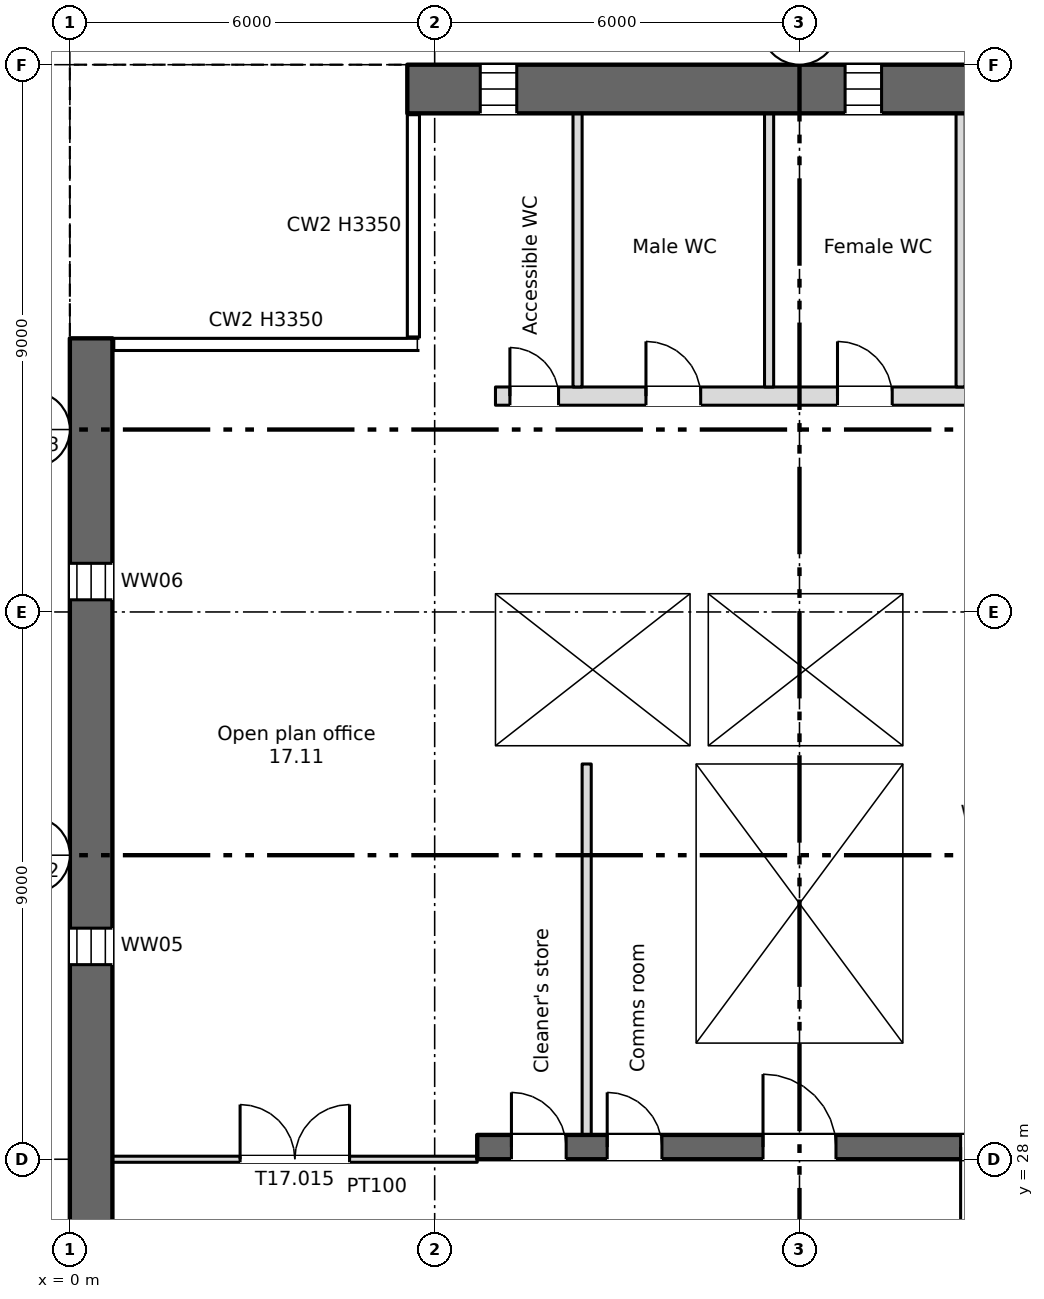
"""IFC4 building model, lengths in metres.
Left out: names, types, materials, properties, quantities, classifications, styles, units other than length and angle.
Written with IfcOpenShell. Run it as: python <this file> out.ifc"""

import sys

from ifc_helpers import new_model, si_unit, direction, frame, frame_2d, origin, place, context, subcontext, project, spatial, rectangle, extrude, element, fill, save


model = new_model("IFC4")
c1 = context("Model", 3, precision=1e-05, world=origin(), true_north=direction((0.0, 1.0)))
c2 = subcontext(c1, "Body", "Model", "MODEL_VIEW")
j1 = project(units=[si_unit("LENGTHUNIT", "METRE"), si_unit("PLANEANGLEUNIT", "RADIAN")], contexts=[c1])
p1 = place(None, origin())
s1 = spatial("IfcSite", under=j1, at=p1, CompositionType="ELEMENT")
p2 = place(p1, origin())
s2 = spatial("IfcBuilding", under=s1, at=p2, CompositionType="ELEMENT")
p3 = place(p2, frame((0.0, 0.0, 110.0)))
s3 = spatial("IfcBuildingStorey", under=s2, at=p3, CompositionType="ELEMENT", Elevation=110.0)
p4 = place(p3, frame((0.35, 6.0, 0.0), z_axis=(0.0, 0.0, 1.0), x_axis=(0.0, 1.0, 0.0)))
e1 = element("IfcWall", 1, at=p4, inside=s3, PredefinedType="SHEAR", context=c2, shape_type="SweptSolid", body=[
    extrude(rectangle(XDim=35.5, YDim=0.7, at=frame_2d((17.75, 0.0))), origin(), (0.0, 0.0, 1.0), 3.35),
])
p5 = place(p4, frame((1.2, 0.0, 0.6)))
e2 = element("IfcOpeningElement", 2, at=p5, cuts=e1, PredefinedType="OPENING", context=c2, shape_type="SweptSolid", body=[
    extrude(rectangle(XDim=0.6, YDim=2.4, at=frame_2d((0.3, 1.2))), frame((0.0, 0.36, 0.0), z_axis=(0.0, -1.0, 0.0), x_axis=(1.0, 0.0, 0.0)), (0.0, 0.0, 1.0), 0.72),
])
p6 = place(p4, frame((7.2, 0.0, 0.6)))
e3 = element("IfcOpeningElement", 3, at=p6, cuts=e1, PredefinedType="OPENING", context=c2, shape_type="SweptSolid", body=[
    extrude(rectangle(XDim=0.6, YDim=2.4, at=frame_2d((0.3, 1.2))), frame((0.0, 0.36, 0.0), z_axis=(0.0, -1.0, 0.0), x_axis=(1.0, 0.0, 0.0)), (0.0, 0.0, 1.0), 0.72),
])
p7 = place(p4, frame((13.2, 0.0, 0.6)))
e4 = element("IfcOpeningElement", 4, at=p7, cuts=e1, PredefinedType="OPENING", context=c2, shape_type="SweptSolid", body=[
    extrude(rectangle(XDim=0.6, YDim=2.4, at=frame_2d((0.3, 1.2))), frame((0.0, 0.36, 0.0), z_axis=(0.0, -1.0, 0.0), x_axis=(1.0, 0.0, 0.0)), (0.0, 0.0, 1.0), 0.72),
])
p8 = place(p4, frame((19.2, 0.0, 0.6)))
e5 = element("IfcOpeningElement", 5, at=p8, cuts=e1, PredefinedType="OPENING", context=c2, shape_type="SweptSolid", body=[
    extrude(rectangle(XDim=0.6, YDim=2.4, at=frame_2d((0.3, 1.2))), frame((0.0, 0.36, 0.0), z_axis=(0.0, -1.0, 0.0), x_axis=(1.0, 0.0, 0.0)), (0.0, 0.0, 1.0), 0.72),
])
p9 = place(p4, frame((25.2, 0.0, 0.6)))
e6 = element("IfcOpeningElement", 6, at=p9, cuts=e1, PredefinedType="OPENING", context=c2, shape_type="SweptSolid", body=[
    extrude(rectangle(XDim=0.6, YDim=2.4, at=frame_2d((0.3, 1.2))), frame((0.0, 0.36, 0.0), z_axis=(0.0, -1.0, 0.0), x_axis=(1.0, 0.0, 0.0)), (0.0, 0.0, 1.0), 0.72),
])
p10 = place(p4, frame((31.2, 0.0, 0.6)))
e7 = element("IfcOpeningElement", 7, at=p10, cuts=e1, PredefinedType="OPENING", context=c2, shape_type="SweptSolid", body=[
    extrude(rectangle(XDim=0.6, YDim=2.4, at=frame_2d((0.3, 1.2))), frame((0.0, 0.36, 0.0), z_axis=(0.0, -1.0, 0.0), x_axis=(1.0, 0.0, 0.0)), (0.0, 0.0, 1.0), 0.72),
])
p11 = place(p3, frame((5.55, 45.6, 0.0), z_axis=(0.0, 0.0, 1.0), x_axis=(1.0, 0.0, 0.0)))
e8 = element("IfcWall", 8, at=p11, inside=s3, PredefinedType="SHEAR", context=c2, shape_type="SweptSolid", body=[
    extrude(rectangle(XDim=60.9, YDim=0.8, at=frame_2d((30.45, 0.0))), origin(), (0.0, 0.0, 1.0), 3.35),
])
p12 = place(p11, frame((1.2, 0.0, 0.6)))
e9 = element("IfcOpeningElement", 9, at=p12, cuts=e8, PredefinedType="OPENING", context=c2, shape_type="SweptSolid", body=[
    extrude(rectangle(XDim=0.6, YDim=2.4, at=frame_2d((0.3, 1.2))), frame((0.0, 0.41, 0.0), z_axis=(0.0, -1.0, 0.0), x_axis=(1.0, 0.0, 0.0)), (0.0, 0.0, 1.0), 0.82),
])
p13 = place(p11, frame((7.2, 0.0, 0.6)))
e10 = element("IfcOpeningElement", 10, at=p13, cuts=e8, PredefinedType="OPENING", context=c2, shape_type="SweptSolid", body=[
    extrude(rectangle(XDim=0.6, YDim=2.4, at=frame_2d((0.3, 1.2))), frame((0.0, 0.41, 0.0), z_axis=(0.0, -1.0, 0.0), x_axis=(1.0, 0.0, 0.0)), (0.0, 0.0, 1.0), 0.82),
])
p14 = place(p3, frame((6.7, 28.2, 0.0), z_axis=(0.0, 0.0, 1.0), x_axis=(1.0, 0.0, 0.0)))
e11 = element("IfcWall", 11, at=p14, inside=s3, PredefinedType="SHEAR", context=c2, shape_type="SweptSolid", body=[
    extrude(rectangle(XDim=57.8, YDim=0.4, at=frame_2d((28.9, 0.0))), origin(), (0.0, 0.0, 1.0), 3.35),
])
p15 = place(p14, frame((12.562, 0.0, 0.0)))
e12 = element("IfcOpeningElement", 12, at=p15, cuts=e11, PredefinedType="OPENING", context=c2, shape_type="SweptSolid", body=[
    extrude(rectangle(XDim=0.9, YDim=2.1, at=frame_2d((0.45, 1.05))), frame((0.0, 0.21, 0.0), z_axis=(0.0, -1.0, 0.0), x_axis=(1.0, 0.0, 0.0)), (0.0, 0.0, 1.0), 0.42),
])
p16 = place(p14, frame((15.137, 0.0, 0.0)))
e13 = element("IfcOpeningElement", 13, at=p16, cuts=e11, PredefinedType="OPENING", context=c2, shape_type="SweptSolid", body=[
    extrude(rectangle(XDim=0.9, YDim=2.1, at=frame_2d((0.45, 1.05))), frame((0.0, 0.21, 0.0), z_axis=(0.0, -1.0, 0.0), x_axis=(1.0, 0.0, 0.0)), (0.0, 0.0, 1.0), 0.42),
])
p17 = place(p14, frame((49.85, 0.0, 0.0)))
e14 = element("IfcOpeningElement", 14, at=p17, cuts=e11, PredefinedType="OPENING", context=c2, shape_type="SweptSolid", body=[
    extrude(rectangle(XDim=0.9, YDim=2.1, at=frame_2d((0.45, 1.05))), frame((0.0, 0.21, 0.0), z_axis=(0.0, -1.0, 0.0), x_axis=(1.0, 0.0, 0.0)), (0.0, 0.0, 1.0), 0.42),
])
p18 = place(p14, frame((0.562, 0.0, 0.0)))
e15 = element("IfcOpeningElement", 15, at=p18, cuts=e11, PredefinedType="OPENING", context=c2, shape_type="SweptSolid", body=[
    extrude(rectangle(XDim=0.9, YDim=2.1, at=frame_2d((0.45, 1.05))), frame((0.0, 0.21, 0.0), z_axis=(0.0, -1.0, 0.0), x_axis=(1.0, 0.0, 0.0)), (0.0, 0.0, 1.0), 0.42),
])
p19 = place(p14, frame((2.137, 0.0, 0.0)))
e16 = element("IfcOpeningElement", 16, at=p19, cuts=e11, PredefinedType="OPENING", context=c2, shape_type="SweptSolid", body=[
    extrude(rectangle(XDim=0.9, YDim=2.1, at=frame_2d((0.45, 1.05))), frame((0.0, 0.21, 0.0), z_axis=(0.0, -1.0, 0.0), x_axis=(1.0, 0.0, 0.0)), (0.0, 0.0, 1.0), 0.42),
])
p20 = place(p14, frame((4.7, 0.0, 0.0)))
e17 = element("IfcOpeningElement", 17, at=p20, cuts=e11, PredefinedType="OPENING", context=c2, shape_type="SweptSolid", body=[
    extrude(rectangle(XDim=1.2, YDim=2.1, at=frame_2d((0.6, 1.05))), frame((0.0, 0.21, 0.0), z_axis=(0.0, -1.0, 0.0), x_axis=(1.0, 0.0, 0.0)), (0.0, 0.0, 1.0), 0.42),
])
p21 = place(p14, frame((31.7, 0.0, 0.0)))
e18 = element("IfcOpeningElement", 18, at=p21, cuts=e11, PredefinedType="OPENING", context=c2, shape_type="SweptSolid", body=[
    extrude(rectangle(XDim=1.2, YDim=2.1, at=frame_2d((0.6, 1.05))), frame((0.0, 0.21, 0.0), z_axis=(0.0, -1.0, 0.0), x_axis=(1.0, 0.0, 0.0)), (0.0, 0.0, 1.0), 0.42),
])
p22 = place(p14, frame((55.2, 0.0, 0.0)))
e19 = element("IfcOpeningElement", 19, at=p22, cuts=e11, PredefinedType="OPENING", context=c2, shape_type="SweptSolid", body=[
    extrude(rectangle(XDim=1.2, YDim=2.1, at=frame_2d((0.6, 1.05))), frame((0.0, 0.21, 0.0), z_axis=(0.0, -1.0, 0.0), x_axis=(1.0, 0.0, 0.0)), (0.0, 0.0, 1.0), 0.42),
])
p23 = place(p14, frame((21.7, 0.0, 0.0)))
e20 = element("IfcOpeningElement", 20, at=p23, cuts=e11, PredefinedType="OPENING", context=c2, shape_type="SweptSolid", body=[
    extrude(rectangle(XDim=1.2, YDim=2.1, at=frame_2d((0.6, 1.05))), frame((0.0, 0.21, 0.0), z_axis=(0.0, -1.0, 0.0), x_axis=(1.0, 0.0, 0.0)), (0.0, 0.0, 1.0), 0.42),
])
p24 = place(p14, frame((41.7, 0.0, 0.0)))
e21 = element("IfcOpeningElement", 21, at=p24, cuts=e11, PredefinedType="OPENING", context=c2, shape_type="SweptSolid", body=[
    extrude(rectangle(XDim=1.2, YDim=2.1, at=frame_2d((0.6, 1.05))), frame((0.0, 0.21, 0.0), z_axis=(0.0, -1.0, 0.0), x_axis=(1.0, 0.0, 0.0)), (0.0, 0.0, 1.0), 0.42),
])
p25 = place(p14, frame((24.85, 0.0, 0.0)))
e22 = element("IfcOpeningElement", 22, at=p25, cuts=e11, PredefinedType="OPENING", context=c2, shape_type="SweptSolid", body=[
    extrude(rectangle(XDim=2.4, YDim=2.1, at=frame_2d((1.2, 1.05))), frame((0.0, 0.21, 0.0), z_axis=(0.0, -1.0, 0.0), x_axis=(1.0, 0.0, 0.0)), (0.0, 0.0, 1.0), 0.42),
])
p26 = place(p14, frame((37.35, 0.0, 0.0)))
e23 = element("IfcOpeningElement", 23, at=p26, cuts=e11, PredefinedType="OPENING", context=c2, shape_type="SweptSolid", body=[
    extrude(rectangle(XDim=2.4, YDim=2.1, at=frame_2d((1.2, 1.05))), frame((0.0, 0.21, 0.0), z_axis=(0.0, -1.0, 0.0), x_axis=(1.0, 0.0, 0.0)), (0.0, 0.0, 1.0), 0.42),
])
p27 = place(p14, frame((7.95, 0.0, 0.0)))
e24 = element("IfcOpeningElement", 24, at=p27, cuts=e11, PredefinedType="OPENING", context=c2, shape_type="SweptSolid", body=[
    extrude(rectangle(XDim=2.4, YDim=2.1, at=frame_2d((1.2, 1.05))), frame((0.0, 0.21, 0.0), z_axis=(0.0, -1.0, 0.0), x_axis=(1.0, 0.0, 0.0)), (0.0, 0.0, 1.0), 0.42),
])
p28 = place(p14, frame((28.85, 0.0, 0.0)))
e25 = element("IfcOpeningElement", 25, at=p28, cuts=e11, PredefinedType="OPENING", context=c2, shape_type="SweptSolid", body=[
    extrude(rectangle(XDim=0.9, YDim=2.1, at=frame_2d((0.45, 1.05))), frame((0.0, 0.21, 0.0), z_axis=(0.0, -1.0, 0.0), x_axis=(1.0, 0.0, 0.0)), (0.0, 0.0, 1.0), 0.42),
])
p29 = place(p14, frame((34.85, 0.0, 0.0)))
e26 = element("IfcOpeningElement", 26, at=p29, cuts=e11, PredefinedType="OPENING", context=c2, shape_type="SweptSolid", body=[
    extrude(rectangle(XDim=0.9, YDim=2.1, at=frame_2d((0.45, 1.05))), frame((0.0, 0.21, 0.0), z_axis=(0.0, -1.0, 0.0), x_axis=(1.0, 0.0, 0.0)), (0.0, 0.0, 1.0), 0.42),
])
p30 = place(p3, frame((6.85, 28.4, 0.0), z_axis=(0.0, 0.0, 1.0), x_axis=(0.0, 1.0, 0.0)))
e27 = element("IfcWall", 27, at=p30, inside=s3, PredefinedType="SHEAR", context=c2, shape_type="SweptSolid", body=[
    extrude(rectangle(XDim=16.8, YDim=0.3, at=frame_2d((8.4, 0.0))), origin(), (0.0, 0.0, 1.0), 3.35),
])
for number, where, z_axis, x_axis in (
    (28, (10.15, 28.4, 0.0), (0.0, 0.0, 1.0), (0.0, 1.0, 0.0)),
    (29, (13.85, 28.4, 0.0), (0.0, 0.0, 1.0), (0.0, 1.0, 0.0)),
):
    element("IfcWall", number, at=place(p3, frame(where, z_axis=z_axis, x_axis=x_axis)), inside=s3, PredefinedType="SHEAR", context=c2, shape_type="SweptSolid", body=[
        extrude(rectangle(XDim=6.1, YDim=0.3, at=frame_2d((3.05, 0.0))), origin(), (0.0, 0.0, 1.0), 3.35),
    ])
for number, where, z_axis, x_axis in (
    (30, (7.0, 34.65, 0.0), (0.0, 0.0, 1.0), (1.0, 0.0, 0.0)),
    (31, (7.0, 37.45, 0.0), (0.0, 0.0, 1.0), (1.0, 0.0, 0.0)),
):
    element("IfcWall", number, at=place(p3, frame(where, z_axis=z_axis, x_axis=x_axis)), inside=s3, PredefinedType="SHEAR", context=c2, shape_type="SweptSolid", body=[
        extrude(rectangle(XDim=7.0, YDim=0.3, at=frame_2d((3.5, 0.0))), origin(), (0.0, 0.0, 1.0), 3.35),
    ])
p31 = place(p3, frame((13.85, 34.8, 0.0), z_axis=(0.0, 0.0, 1.0), x_axis=(0.0, 1.0, 0.0)))
e32 = element("IfcWall", 32, at=p31, inside=s3, PredefinedType="SHEAR", context=c2, shape_type="SweptSolid", body=[
    extrude(rectangle(XDim=2.5, YDim=0.3, at=frame_2d((1.25, 0.0))), origin(), (0.0, 0.0, 1.0), 3.35),
])
p32 = place(p3, frame((7.0, 40.55, 0.0), z_axis=(0.0, 0.0, 1.0), x_axis=(1.0, 0.0, 0.0)))
e33 = element("IfcWall", 33, at=p32, inside=s3, PredefinedType="PARTITIONING", context=c2, shape_type="SweptSolid", body=[
    extrude(rectangle(XDim=9.2, YDim=0.3, at=frame_2d((4.6, 0.0))), origin(), (0.0, 0.0, 1.0), 3.35),
])
p33 = place(p32, frame((0.238, 0.0, 0.0)))
e34 = element("IfcOpeningElement", 34, at=p33, cuts=e33, PredefinedType="OPENING", context=c2, shape_type="SweptSolid", body=[
    extrude(rectangle(XDim=0.8, YDim=2.1, at=frame_2d((0.4, 1.05))), frame((0.0, 0.16, 0.0), z_axis=(0.0, -1.0, 0.0), x_axis=(1.0, 0.0, 0.0)), (0.0, 0.0, 1.0), 0.32),
])
p34 = place(p32, frame((2.475, 0.0, 0.0)))
e35 = element("IfcOpeningElement", 35, at=p34, cuts=e33, PredefinedType="OPENING", context=c2, shape_type="SweptSolid", body=[
    extrude(rectangle(XDim=0.9, YDim=2.1, at=frame_2d((0.45, 1.05))), frame((0.0, 0.16, 0.0), z_axis=(0.0, -1.0, 0.0), x_axis=(1.0, 0.0, 0.0)), (0.0, 0.0, 1.0), 0.32),
])
p35 = place(p32, frame((5.625, 0.0, 0.0)))
e36 = element("IfcOpeningElement", 36, at=p35, cuts=e33, PredefinedType="OPENING", context=c2, shape_type="SweptSolid", body=[
    extrude(rectangle(XDim=0.9, YDim=2.1, at=frame_2d((0.45, 1.05))), frame((0.0, 0.16, 0.0), z_axis=(0.0, -1.0, 0.0), x_axis=(1.0, 0.0, 0.0)), (0.0, 0.0, 1.0), 0.32),
])
p36 = place(p32, frame((7.938, 0.0, 0.0)))
e37 = element("IfcOpeningElement", 37, at=p36, cuts=e33, PredefinedType="OPENING", context=c2, shape_type="SweptSolid", body=[
    extrude(rectangle(XDim=0.9, YDim=2.1, at=frame_2d((0.45, 1.05))), frame((0.0, 0.16, 0.0), z_axis=(0.0, -1.0, 0.0), x_axis=(1.0, 0.0, 0.0)), (0.0, 0.0, 1.0), 0.32),
])
p37 = place(p3, frame((10.35, 34.8, 0.0), z_axis=(0.0, 0.0, 1.0), x_axis=(0.0, 1.0, 0.0)))
e38 = element("IfcWall", 38, at=p37, inside=s3, PredefinedType="SHEAR", context=c2, shape_type="SweptSolid", body=[
    extrude(rectangle(XDim=2.5, YDim=0.3, at=frame_2d((1.25, 0.0))), origin(), (0.0, 0.0, 1.0), 3.35),
])
p38 = place(p3, frame((8.5, 28.4, 0.0), z_axis=(0.0, 0.0, 1.0), x_axis=(0.0, 1.0, 0.0)))
e39 = element("IfcWall", 39, at=p38, inside=s3, PredefinedType="PARTITIONING", context=c2, shape_type="SweptSolid", body=[
    extrude(rectangle(XDim=6.1, YDim=0.15, at=frame_2d((3.05, 0.0))), origin(), (0.0, 0.0, 1.0), 3.35),
])
for number, where, z_axis, x_axis in (
    (40, (8.35, 40.7, 0.0), (0.0, 0.0, 1.0), (0.0, 1.0, 0.0)),
    (41, (11.5, 40.7, 0.0), (0.0, 0.0, 1.0), (0.0, 1.0, 0.0)),
    (42, (14.65, 40.7, 0.0), (0.0, 0.0, 1.0), (0.0, 1.0, 0.0)),
):
    element("IfcWall", number, at=place(p3, frame(where, z_axis=z_axis, x_axis=x_axis)), inside=s3, PredefinedType="PARTITIONING", context=c2, shape_type="SweptSolid", body=[
        extrude(rectangle(XDim=4.5, YDim=0.15, at=frame_2d((2.25, 0.0))), origin(), (0.0, 0.0, 1.0), 3.35),
    ])
p39 = place(p3, frame((0.7, 28.0, 0.0), z_axis=(0.0, 0.0, 1.0), x_axis=(1.0, 0.0, 0.0)))
e43 = element("IfcWall", 43, at=p39, inside=s3, PredefinedType="PARTITIONING", context=c2, shape_type="SweptSolid", body=[
    extrude(rectangle(XDim=6.0, YDim=0.1, at=frame_2d((3.0, 0.0))), origin(), (0.0, 0.0, 1.0), 3.35),
])
p40 = place(p39, frame((2.1, 0.0, 0.0)))
e44 = element("IfcOpeningElement", 44, at=p40, cuts=e43, PredefinedType="OPENING", context=c2, shape_type="SweptSolid", body=[
    extrude(rectangle(XDim=1.8, YDim=2.1, at=frame_2d((0.9, 1.05))), frame((0.0, 0.06, 0.0), z_axis=(0.0, -1.0, 0.0), x_axis=(1.0, 0.0, 0.0)), (0.0, 0.0, 1.0), 0.12),
])
p41 = place(p12, origin())
e45 = element("IfcWindow", 45, at=p41, inside=s3, PartitioningType="SINGLE_PANEL", PredefinedType="WINDOW", context=c2, shape_type="SweptSolid", body=[
    extrude(rectangle(XDim=0.6, YDim=2.4, at=frame_2d((0.3, 1.2))), frame((0.0, 0.03, 0.0), z_axis=(0.0, -1.0, 0.0), x_axis=(1.0, 0.0, 0.0)), (0.0, 0.0, 1.0), 0.06),
])
fill(e9, e45)
p42 = place(p13, origin())
e46 = element("IfcWindow", 46, at=p42, inside=s3, PartitioningType="SINGLE_PANEL", PredefinedType="WINDOW", context=c2, shape_type="SweptSolid", body=[
    extrude(rectangle(XDim=0.6, YDim=2.4, at=frame_2d((0.3, 1.2))), frame((0.0, 0.03, 0.0), z_axis=(0.0, -1.0, 0.0), x_axis=(1.0, 0.0, 0.0)), (0.0, 0.0, 1.0), 0.06),
])
fill(e10, e46)
p43 = place(p9, origin())
e47 = element("IfcWindow", 47, at=p43, inside=s3, PartitioningType="SINGLE_PANEL", PredefinedType="WINDOW", context=c2, shape_type="SweptSolid", body=[
    extrude(rectangle(XDim=0.6, YDim=2.4, at=frame_2d((0.3, 1.2))), frame((0.0, 0.03, 0.0), z_axis=(0.0, -1.0, 0.0), x_axis=(1.0, 0.0, 0.0)), (0.0, 0.0, 1.0), 0.06),
])
fill(e6, e47)
p44 = place(p10, origin())
e48 = element("IfcWindow", 48, at=p44, inside=s3, PartitioningType="SINGLE_PANEL", PredefinedType="WINDOW", context=c2, shape_type="SweptSolid", body=[
    extrude(rectangle(XDim=0.6, YDim=2.4, at=frame_2d((0.3, 1.2))), frame((0.0, 0.03, 0.0), z_axis=(0.0, -1.0, 0.0), x_axis=(1.0, 0.0, 0.0)), (0.0, 0.0, 1.0), 0.06),
])
fill(e7, e48)
p45 = place(p18, origin())
e49 = element("IfcDoor", 49, at=p45, inside=s3, OperationType="SINGLE_SWING_LEFT", PredefinedType="DOOR", context=c2, shape_type="SweptSolid", body=[
    extrude(rectangle(XDim=0.9, YDim=2.1, at=frame_2d((0.45, 1.05))), frame((0.0, 0.025, 0.0), z_axis=(0.0, -1.0, 0.0), x_axis=(1.0, 0.0, 0.0)), (0.0, 0.0, 1.0), 0.05),
])
fill(e15, e49)
p46 = place(p19, origin())
e50 = element("IfcDoor", 50, at=p46, inside=s3, OperationType="SINGLE_SWING_LEFT", PredefinedType="DOOR", context=c2, shape_type="SweptSolid", body=[
    extrude(rectangle(XDim=0.9, YDim=2.1, at=frame_2d((0.45, 1.05))), frame((0.0, 0.025, 0.0), z_axis=(0.0, -1.0, 0.0), x_axis=(1.0, 0.0, 0.0)), (0.0, 0.0, 1.0), 0.05),
])
fill(e16, e50)
p47 = place(p33, origin())
e51 = element("IfcDoor", 51, at=p47, inside=s3, OperationType="SINGLE_SWING_LEFT", PredefinedType="DOOR", context=c2, shape_type="SweptSolid", body=[
    extrude(rectangle(XDim=0.8, YDim=2.1, at=frame_2d((0.4, 1.05))), frame((0.0, 0.025, 0.0), z_axis=(0.0, -1.0, 0.0), x_axis=(1.0, 0.0, 0.0)), (0.0, 0.0, 1.0), 0.05),
])
fill(e34, e51)
p48 = place(p34, origin())
e52 = element("IfcDoor", 52, at=p48, inside=s3, OperationType="SINGLE_SWING_LEFT", PredefinedType="DOOR", context=c2, shape_type="SweptSolid", body=[
    extrude(rectangle(XDim=0.9, YDim=2.1, at=frame_2d((0.45, 1.05))), frame((0.0, 0.025, 0.0), z_axis=(0.0, -1.0, 0.0), x_axis=(1.0, 0.0, 0.0)), (0.0, 0.0, 1.0), 0.05),
])
fill(e35, e52)
p49 = place(p35, origin())
e53 = element("IfcDoor", 53, at=p49, inside=s3, OperationType="SINGLE_SWING_LEFT", PredefinedType="DOOR", context=c2, shape_type="SweptSolid", body=[
    extrude(rectangle(XDim=0.9, YDim=2.1, at=frame_2d((0.45, 1.05))), frame((0.0, 0.025, 0.0), z_axis=(0.0, -1.0, 0.0), x_axis=(1.0, 0.0, 0.0)), (0.0, 0.0, 1.0), 0.05),
])
fill(e36, e53)
p50 = place(p20, origin())
e54 = element("IfcDoor", 54, at=p50, inside=s3, OperationType="SINGLE_SWING_LEFT", PredefinedType="DOOR", context=c2, shape_type="SweptSolid", body=[
    extrude(rectangle(XDim=1.2, YDim=2.1, at=frame_2d((0.6, 1.05))), frame((0.0, 0.025, 0.0), z_axis=(0.0, -1.0, 0.0), x_axis=(1.0, 0.0, 0.0)), (0.0, 0.0, 1.0), 0.05),
])
fill(e17, e54)
p51 = place(p27, origin())
e55 = element("IfcDoor", 55, at=p51, inside=s3, OperationType="DOUBLE_DOOR_SINGLE_SWING", PredefinedType="DOOR", context=c2, shape_type="SweptSolid", body=[
    extrude(rectangle(XDim=2.4, YDim=2.1, at=frame_2d((1.2, 1.05))), frame((0.0, 0.025, 0.0), z_axis=(0.0, -1.0, 0.0), x_axis=(1.0, 0.0, 0.0)), (0.0, 0.0, 1.0), 0.05),
])
fill(e24, e55)
p52 = place(p40, origin())
e56 = element("IfcDoor", 56, at=p52, inside=s3, OperationType="DOUBLE_DOOR_SINGLE_SWING", PredefinedType="DOOR", context=c2, shape_type="SweptSolid", body=[
    extrude(rectangle(XDim=1.8, YDim=2.1, at=frame_2d((0.9, 1.05))), frame((0.0, 0.025, 0.0), z_axis=(0.0, -1.0, 0.0), x_axis=(1.0, 0.0, 0.0)), (0.0, 0.0, 1.0), 0.05),
])
fill(e44, e56)
save(model, sys.argv[1])
